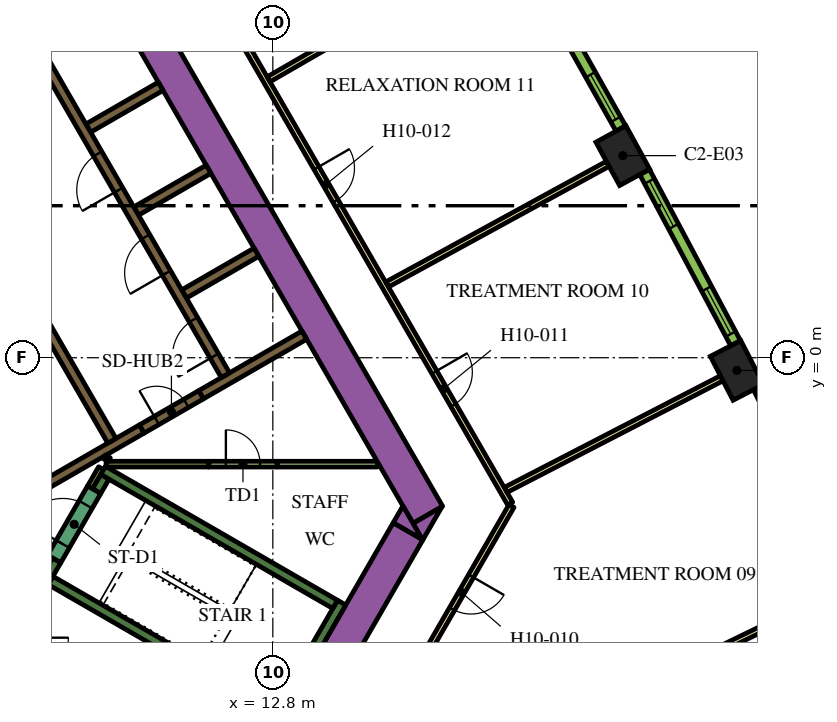
"""IFC4 building model, lengths in metres.
Left out: names, types, materials, properties, quantities, classifications, styles, units other than length and angle.
Written with IfcOpenShell. Run it as: python <this file> out.ifc"""

import sys

from ifc_helpers import new_model, si_unit, direction, frame, frame_2d, origin, origin_2d, place, context, subcontext, project, spatial, polyline, rectangle, outline, extrude, element, fill, save


model = new_model("IFC4")
c1 = context("Model", 3, precision=1e-05, world=origin(), true_north=direction((0.0, 1.0)))
c2 = subcontext(c1, "Body", "Model", "MODEL_VIEW")
j1 = project(units=[si_unit("LENGTHUNIT", "METRE"), si_unit("PLANEANGLEUNIT", "RADIAN")], contexts=[c1])
p1 = place(None, origin())
s1 = spatial("IfcSite", under=j1, at=p1, CompositionType="ELEMENT")
p2 = place(p1, origin())
s2 = spatial("IfcBuilding", under=s1, at=p2, CompositionType="ELEMENT")
p3 = place(p2, frame((0.0, 0.0, 130.5)))
s3 = spatial("IfcBuildingStorey", under=s2, at=p3, CompositionType="ELEMENT", Elevation=130.5)
for number, where, z_axis, x_axis in (
    (1, (25.012, -0.334, 0.0), (0.0, 0.0, 1.0), (-0.459, 0.888, 0.0)),
    (2, (22.009, 5.317, 0.0), (0.0, 0.0, 1.0), (-0.48, 0.877, 0.0)),
):
    element("IfcColumn", number, at=place(p3, frame(where, z_axis=z_axis, x_axis=x_axis)), inside=s3, PredefinedType="COLUMN", context=c2, shape_type="SweptSolid", body=[
        extrude(rectangle(XDim=1.3, YDim=0.9, at=origin_2d()), origin(), (0.0, 0.0, 1.0), 3.9),
    ])
p4 = place(p3, frame((6.776, 13.364, 0.0), z_axis=(0.0, 0.0, 1.0), x_axis=(0.500004177138, -0.8660229921, 0.0)))
e3 = element("IfcWall", 3, at=p4, inside=s3, PredefinedType="SOLIDWALL", context=c2, shape_type="SweptSolid", body=[
    extrude(rectangle(XDim=20.204, YDim=0.9, at=frame_2d((10.102, 0.0))), origin(), (0.0, 0.0, 1.0), 3.9),
])
p5 = place(p3, origin())
e4 = element("IfcWall", 4, at=p5, inside=s3, PredefinedType="SOLIDWALL", context=c2, shape_type="SweptSolid", body=[
    extrude(outline(polyline([(16.743, -4.8), (16.489, -4.36), (17.251, -3.92), (16.743, -4.8)])), origin(), (0.0, 0.0, 1.0), 3.9),
])
p6 = place(p3, frame((11.695, -12.644, 0.0), z_axis=(0.0, 0.0, 1.0), x_axis=(0.500010229568, 0.86601949766, 0.0)))
e5 = element("IfcWall", 5, at=p6, inside=s3, PredefinedType="SOLIDWALL", context=c2, shape_type="SweptSolid", body=[
    extrude(rectangle(XDim=9.326, YDim=0.9, at=frame_2d((4.663, 0.0))), origin(), (0.0, 0.0, 1.0), 3.9),
])
e6 = element("IfcWall", 6, at=p5, inside=s3, PredefinedType="SOLIDWALL", context=c2, shape_type="SweptSolid", body=[
    extrude(outline(polyline([(16.223, -3.9), (16.732, -4.78), (15.969, -4.34), (16.223, -3.9)])), origin(), (0.0, 0.0, 1.0), 3.9),
])
p7 = place(p3, frame((12.885, -9.431, 0.0), z_axis=(0.0, 0.0, 1.0), x_axis=(0.500020560727, 0.866013532718, 0.0)))
e7 = element("IfcWall", 7, at=p7, inside=s3, PredefinedType="SOLIDWALL", context=c2, shape_type="SweptSolid", body=[
    extrude(rectangle(XDim=3.45, YDim=0.25, at=frame_2d((1.725, 0.0))), origin(), (0.0, 0.0, 1.0), 3.9),
])
p8 = place(p3, frame((12.84, -9.261, 0.0), z_axis=(0.0, 0.0, 1.0), x_axis=(-0.866013990052, 0.500019768644, 0.0)))
e8 = element("IfcWall", 8, at=p8, inside=s3, PredefinedType="SOLIDWALL", context=c2, shape_type="SweptSolid", body=[
    extrude(rectangle(XDim=6.8, YDim=0.25, at=frame_2d((3.4, 0.0))), origin(), (0.0, 0.0, 1.0), 3.9),
])
p9 = place(p3, frame((7.113, -5.33, 0.0), z_axis=(0.0, 0.0, 1.0), x_axis=(-0.499965889992, -0.866045096311, 0.0)))
e9 = element("IfcWall", 9, at=p9, inside=s3, PredefinedType="SOLIDWALL", context=c2, shape_type="SweptSolid", body=[
    extrude(rectangle(XDim=0.666, YDim=0.25, at=frame_2d((0.333, 0.0))), origin(), (0.0, 0.0, 1.0), 3.9),
])
p10 = place(p3, frame((8.334, -2.964, 0.0), z_axis=(0.0, 0.0, 1.0), x_axis=(0.866016039709, -0.500016218704, 0.0)))
e10 = element("IfcWall", 10, at=p10, inside=s3, PredefinedType="SOLIDWALL", context=c2, shape_type="SweptSolid", body=[
    extrude(rectangle(XDim=7.05, YDim=0.25, at=frame_2d((3.525, 0.0))), origin(), (0.0, 0.0, 1.0), 3.9),
])
p11 = place(p3, frame((8.163, -3.511, 0.0), z_axis=(0.0, 0.0, 1.0), x_axis=(0.500127794843, 0.865951608824, 0.0)))
e11 = element("IfcWall", 11, at=p11, inside=s3, PredefinedType="SOLIDWALL", context=c2, shape_type="SweptSolid", body=[
    extrude(rectangle(XDim=0.435, YDim=0.25, at=frame_2d((0.217, 0.0))), origin(), (0.0, 0.0, 1.0), 3.9),
])
p12 = place(p3, frame((9.352, -1.875, 0.0), z_axis=(0.0, 0.0, 1.0), x_axis=(-0.866024844342, -0.500000968981, 0.0)))
e12 = element("IfcWall", 12, at=p12, inside=s3, PredefinedType="SOLIDWALL", context=c2, shape_type="SweptSolid", body=[
    extrude(rectangle(XDim=3.162, YDim=0.25, at=frame_2d((1.581, 0.0))), origin(), (0.0, 0.0, 1.0), 3.9),
])
for number, where, z_axis, x_axis in (
    (13, (7.944, 6.041, 0.0), (0.0, 0.0, 1.0), (0.866, 0.5, 0.0)),
    (14, (9.204, 3.859, 0.0), (0.0, 0.0, 1.0), (0.866, 0.5, 0.0)),
):
    element("IfcWall", number, at=place(p3, frame(where, z_axis=z_axis, x_axis=x_axis)), inside=s3, PredefinedType="SOLIDWALL", context=c2, shape_type="SweptSolid", body=[
        extrude(rectangle(XDim=2.2, YDim=0.25, at=frame_2d((1.1, 0.0))), origin(), (0.0, 0.0, 1.0), 3.9),
    ])
p13 = place(p3, frame((10.911, -0.975, 0.0), z_axis=(0.0, 0.0, 1.0), x_axis=(0.866046979468, 0.499962627957, 0.0)))
e15 = element("IfcWall", 15, at=p13, inside=s3, PredefinedType="SOLIDWALL", context=c2, shape_type="SweptSolid", body=[
    extrude(rectangle(XDim=3.138, YDim=0.25, at=frame_2d((1.569, 0.0))), origin(), (0.0, 0.0, 1.0), 3.9),
])
p14 = place(p3, frame((10.464, 1.677, 0.0), z_axis=(0.0, 0.0, 1.0), x_axis=(0.86605622881, 0.499946605688, 0.0)))
e16 = element("IfcWall", 16, at=p14, inside=s3, PredefinedType="SOLIDWALL", context=c2, shape_type="SweptSolid", body=[
    extrude(rectangle(XDim=2.2, YDim=0.25, at=frame_2d((1.1, 0.0))), origin(), (0.0, 0.0, 1.0), 3.9),
])
p15 = place(p3, frame((8.412, -2.8, 0.0), z_axis=(0.0, 0.0, 1.0), x_axis=(1.0, 0.0, 0.0)))
e17 = element("IfcWall", 17, at=p15, inside=s3, PredefinedType="PARTITIONING", context=c2, shape_type="SweptSolid", body=[
    extrude(rectangle(XDim=2.702, YDim=0.15, at=frame_2d((1.351, 0.0))), origin(), (0.0, 0.0, 1.0), 3.9),
])
p16 = place(p3, frame((8.459, -2.599, 0.0), z_axis=(0.0, 0.0, 1.0), x_axis=(-0.501919277433, -0.864914469148, 0.0)))
e18 = element("IfcWall", 18, at=p16, inside=s3, PredefinedType="PARTITIONING", context=c2, shape_type="SweptSolid", body=[
    extrude(rectangle(XDim=0.109, YDim=0.15, at=frame_2d((0.054, 0.0))), origin(), (0.0, 0.0, 1.0), 3.9),
])
p17 = place(p3, frame((8.281, -2.907, 0.0), z_axis=(0.0, 0.0, 1.0), x_axis=(-0.500193841991, -0.86591346013, 0.0)))
e19 = element("IfcWall", 19, at=p17, inside=s3, PredefinedType="PARTITIONING", context=c2, shape_type="SweptSolid", body=[
    extrude(rectangle(XDim=0.583, YDim=0.15, at=frame_2d((0.292, 0.0))), origin(), (0.0, 0.0, 1.0), 3.9),
])
p18 = place(p3, frame((12.915, -2.8, 0.0), z_axis=(0.0, 0.0, 1.0), x_axis=(1.0, 0.0, 0.0)))
e20 = element("IfcWall", 20, at=p18, inside=s3, PredefinedType="PARTITIONING", context=c2, shape_type="SweptSolid", body=[
    extrude(rectangle(XDim=2.637, YDim=0.15, at=frame_2d((1.318, 0.0))), origin(), (0.0, 0.0, 1.0), 2.6),
])
p19 = place(p3, frame((11.553, -0.46, 0.0), z_axis=(0.0, 0.0, 1.0), x_axis=(-0.500006514828, 0.866021642414, 0.0)))
e21 = element("IfcWall", 21, at=p19, inside=s3, PredefinedType="SOLIDWALL", context=c2, shape_type="SweptSolid", body=[
    extrude(rectangle(XDim=12.35, YDim=0.25, at=frame_2d((6.175, 0.0))), origin(), (0.0, 0.0, 1.0), 3.9),
])
p20 = place(p19, frame((0.585, 0.0, 0.0)))
e22 = element("IfcOpeningElement", 22, at=p20, cuts=e21, PredefinedType="OPENING", context=c2, shape_type="SweptSolid", body=[
    extrude(rectangle(XDim=1.1, YDim=2.1, at=frame_2d((0.55, 1.05))), frame((0.0, 0.135, 0.0), z_axis=(0.0, -1.0, 0.0), x_axis=(1.0, 0.0, 0.0)), (0.0, 0.0, 1.0), 0.27),
])
p21 = place(p19, frame((3.105, 0.0, 0.0)))
e23 = element("IfcOpeningElement", 23, at=p21, cuts=e21, PredefinedType="OPENING", context=c2, shape_type="SweptSolid", body=[
    extrude(rectangle(XDim=1.1, YDim=2.1, at=frame_2d((0.55, 1.05))), frame((0.0, 0.135, 0.0), z_axis=(0.0, -1.0, 0.0), x_axis=(1.0, 0.0, 0.0)), (0.0, 0.0, 1.0), 0.27),
])
p22 = place(p19, frame((5.625, 0.0, 0.0)))
e24 = element("IfcOpeningElement", 24, at=p22, cuts=e21, PredefinedType="OPENING", context=c2, shape_type="SweptSolid", body=[
    extrude(rectangle(XDim=1.1, YDim=2.1, at=frame_2d((0.55, 1.05))), frame((0.0, 0.135, 0.0), z_axis=(0.0, -1.0, 0.0), x_axis=(1.0, 0.0, 0.0)), (0.0, 0.0, 1.0), 0.27),
])
p23 = place(p3, frame((8.565, -2.185, 0.0), z_axis=(0.0, 0.0, 1.0), x_axis=(-0.499997954832, 0.866026584559, 0.0)))
e25 = element("IfcWall", 25, at=p23, inside=s3, PredefinedType="SOLIDWALL", context=c2, shape_type="SweptSolid", body=[
    extrude(rectangle(XDim=12.35, YDim=0.25, at=frame_2d((6.175, 0.0))), origin(), (0.0, 0.0, 1.0), 3.9),
])
p24 = place(p23, frame((5.725, 0.0, 0.0)))
e26 = element("IfcOpeningElement", 26, at=p24, cuts=e25, PredefinedType="OPENING", context=c2, shape_type="SweptSolid", body=[
    extrude(rectangle(XDim=0.9, YDim=2.1, at=frame_2d((0.45, 1.05))), frame((0.0, 0.135, 0.0), z_axis=(0.0, -1.0, 0.0), x_axis=(1.0, 0.0, 0.0)), (0.0, 0.0, 1.0), 0.27),
])
p25 = place(p3, frame((7.048, -5.292, 0.0), z_axis=(0.0, 0.0, 1.0), x_axis=(0.49994051562, 0.866059744384, 0.0)))
e27 = element("IfcWall", 27, at=p25, inside=s3, PredefinedType="SOLIDWALL", context=c2, shape_type="SweptSolid", body=[
    extrude(rectangle(XDim=2.1, YDim=0.4, at=frame_2d((1.05, 0.0))), origin(), (0.0, 0.0, 1.0), 3.9),
])
p26 = place(p25, frame((0.45, 0.0, 0.0)))
e28 = element("IfcOpeningElement", 28, at=p26, cuts=e27, PredefinedType="OPENING", context=c2, shape_type="SweptSolid", body=[
    extrude(rectangle(XDim=1.2, YDim=2.1, at=frame_2d((0.6, 1.05))), frame((0.0, 0.21, 0.0), z_axis=(0.0, -1.0, 0.0), x_axis=(1.0, 0.0, 0.0)), (0.0, 0.0, 1.0), 0.42),
])
p27 = place(p3, frame((9.352, -1.875, 0.0), z_axis=(0.0, 0.0, 1.0), x_axis=(0.865989075817, 0.500062916607, 0.0)))
e29 = element("IfcWall", 29, at=p27, inside=s3, PredefinedType="SOLIDWALL", context=c2, shape_type="SweptSolid", body=[
    extrude(rectangle(XDim=1.8, YDim=0.25, at=frame_2d((0.9, 0.0))), origin(), (0.0, 0.0, 1.0), 3.9),
])
p28 = place(p27, frame((0.45, 0.0, 0.0)))
e30 = element("IfcOpeningElement", 30, at=p28, cuts=e29, PredefinedType="OPENING", context=c2, shape_type="SweptSolid", body=[
    extrude(rectangle(XDim=0.9, YDim=2.1, at=frame_2d((0.45, 1.05))), frame((0.0, 0.135, 0.0), z_axis=(0.0, -1.0, 0.0), x_axis=(1.0, 0.0, 0.0)), (0.0, 0.0, 1.0), 0.27),
])
p29 = place(p3, frame((11.115, -2.8, 0.0), z_axis=(0.0, 0.0, 1.0), x_axis=(1.0, 0.0, 0.0)))
e31 = element("IfcWall", 31, at=p29, inside=s3, PredefinedType="PARTITIONING", context=c2, shape_type="SweptSolid", body=[
    extrude(rectangle(XDim=1.8, YDim=0.15, at=frame_2d((0.9, 0.0))), origin(), (0.0, 0.0, 1.0), 2.6),
])
p30 = place(p29, frame((0.45, 0.0, 0.0)))
e32 = element("IfcOpeningElement", 32, at=p30, cuts=e31, PredefinedType="OPENING", context=c2, shape_type="SweptSolid", body=[
    extrude(rectangle(XDim=0.9, YDim=2.1, at=frame_2d((0.45, 1.05))), frame((0.0, 0.085, 0.0), z_axis=(0.0, -1.0, 0.0), x_axis=(1.0, 0.0, 0.0)), (0.0, 0.0, 1.0), 0.17),
])
p31 = place(p3, frame((19.081, -3.9, 0.0), z_axis=(0.0, 0.0, 1.0), x_axis=(-0.499974327079, -0.866040225545, 0.0)))
e33 = element("IfcWall", 33, at=p31, inside=s3, PredefinedType="PARTITIONING", context=c2, shape_type="SweptSolid", body=[
    extrude(rectangle(XDim=5.258, YDim=0.15, at=frame_2d((2.629, 0.0))), origin(), (0.0, 0.0, 1.0), 2.6),
])
p32 = place(p31, frame((2.129, 0.0, 0.0)))
e34 = element("IfcOpeningElement", 34, at=p32, cuts=e33, PredefinedType="OPENING", context=c2, shape_type="SweptSolid", body=[
    extrude(rectangle(XDim=1.0, YDim=2.1, at=frame_2d((0.5, 1.05))), frame((0.0, 0.085, 0.0), z_axis=(0.0, -1.0, 0.0), x_axis=(1.0, 0.0, 0.0)), (0.0, 0.0, 1.0), 0.17),
])
p33 = place(p3, frame((6.163, 18.475, 0.0), z_axis=(0.0, 0.0, 1.0), x_axis=(0.500001317485, -0.866024643133, 0.0)))
e35 = element("IfcWall", 35, at=p33, inside=s3, PredefinedType="PARTITIONING", context=c2, shape_type="SweptSolid", body=[
    extrude(rectangle(XDim=25.767, YDim=0.15, at=frame_2d((12.883, 0.0))), origin(), (0.0, 0.0, 1.0), 2.6),
])
p34 = place(p33, frame((21.774, 0.0, 0.0)))
e36 = element("IfcOpeningElement", 36, at=p34, cuts=e35, PredefinedType="OPENING", context=c2, shape_type="SweptSolid", body=[
    extrude(rectangle(XDim=1.0, YDim=2.1, at=frame_2d((0.5, 1.05))), frame((0.0, 0.085, 0.0), z_axis=(0.0, -1.0, 0.0), x_axis=(1.0, 0.0, 0.0)), (0.0, 0.0, 1.0), 0.17),
])
p35 = place(p33, frame((15.571, 0.0, 0.0)))
e37 = element("IfcOpeningElement", 37, at=p35, cuts=e35, PredefinedType="OPENING", context=c2, shape_type="SweptSolid", body=[
    extrude(rectangle(XDim=1.0, YDim=2.1, at=frame_2d((0.5, 1.05))), frame((0.0, 0.085, 0.0), z_axis=(0.0, -1.0, 0.0), x_axis=(1.0, 0.0, 0.0)), (0.0, 0.0, 1.0), 0.17),
])
p36 = place(p33, frame((9.265, 0.0, 0.0)))
e38 = element("IfcOpeningElement", 38, at=p36, cuts=e35, PredefinedType="OPENING", context=c2, shape_type="SweptSolid", body=[
    extrude(rectangle(XDim=1.0, YDim=2.1, at=frame_2d((0.5, 1.05))), frame((0.0, 0.085, 0.0), z_axis=(0.0, -1.0, 0.0), x_axis=(1.0, 0.0, 0.0)), (0.0, 0.0, 1.0), 0.17),
])
p37 = place(p33, frame((3.063, 0.0, 0.0)))
e39 = element("IfcOpeningElement", 39, at=p37, cuts=e35, PredefinedType="OPENING", context=c2, shape_type="SweptSolid", body=[
    extrude(rectangle(XDim=1.0, YDim=2.1, at=frame_2d((0.5, 1.05))), frame((0.0, 0.085, 0.0), z_axis=(0.0, -1.0, 0.0), x_axis=(1.0, 0.0, 0.0)), (0.0, 0.0, 1.0), 0.17),
])
p38 = place(p3, frame((18.484, 10.672, 0.0), z_axis=(0.0, 0.0, 1.0), x_axis=(-0.866019162053, -0.50001081084, 0.0)))
e40 = element("IfcWall", 40, at=p38, inside=s3, PredefinedType="PARTITIONING", context=c2, shape_type="SweptSolid", body=[
    extrude(rectangle(XDim=6.694, YDim=0.15, at=frame_2d((3.347, 0.0))), origin(), (0.0, 0.0, 1.0), 2.6),
])
p39 = place(p3, frame((21.614, 5.102, 0.0), z_axis=(0.0, 0.0, 1.0), x_axis=(-0.877484555087, -0.479604895287, 0.0)))
e41 = element("IfcWall", 41, at=p39, inside=s3, PredefinedType="PARTITIONING", context=c2, shape_type="SweptSolid", body=[
    extrude(rectangle(XDim=6.611, YDim=0.15, at=frame_2d((3.306, 0.0))), origin(), (0.0, 0.0, 1.0), 2.6),
])
p40 = place(p3, frame((24.613, -0.541, 0.0), z_axis=(0.0, 0.0, 1.0), x_axis=(-0.888459912519, -0.458954228487, 0.0)))
e42 = element("IfcWall", 42, at=p40, inside=s3, PredefinedType="PARTITIONING", context=c2, shape_type="SweptSolid", body=[
    extrude(rectangle(XDim=6.392, YDim=0.15, at=frame_2d((3.196, 0.0))), origin(), (0.0, 0.0, 1.0), 2.6),
])
p41 = place(p3, frame((27.479, -6.251, 0.0), z_axis=(0.0, 0.0, 1.0), x_axis=(-0.898945877276, -0.438059710231, 0.0)))
e43 = element("IfcWall", 43, at=p41, inside=s3, PredefinedType="PARTITIONING", context=c2, shape_type="SweptSolid", body=[
    extrude(rectangle(XDim=8.909, YDim=0.15, at=frame_2d((4.455, 0.0))), origin(), (0.0, 0.0, 1.0), 2.6),
])
p42 = place(p3, frame((27.864, -5.336, 0.0), z_axis=(0.0, 0.0, 1.0), x_axis=(-0.448534297211, 0.893765620409, 0.0)))
e44 = element("IfcWall", 44, at=p42, inside=s3, PredefinedType="SOLIDWALL", context=c2, shape_type="SweptSolid", body=[
    extrude(rectangle(XDim=5.1, YDim=0.29, at=frame_2d((2.55, 0.0))), origin(), (0.0, 0.0, 1.0), 3.5),
])
p43 = place(p42, frame((0.272, 0.0, 0.9)))
e45 = element("IfcOpeningElement", 45, at=p43, cuts=e44, PredefinedType="OPENING", context=c2, shape_type="SweptSolid", body=[
    extrude(rectangle(XDim=1.35, YDim=2.15, at=frame_2d((0.675, 1.075))), frame((0.0, 0.155, 0.0), z_axis=(0.0, -1.0, 0.0), x_axis=(1.0, 0.0, 0.0)), (0.0, 0.0, 1.0), 0.31),
])
p44 = place(p42, frame((3.478, 0.0, 0.9)))
e46 = element("IfcOpeningElement", 46, at=p44, cuts=e44, PredefinedType="OPENING", context=c2, shape_type="SweptSolid", body=[
    extrude(rectangle(XDim=1.35, YDim=2.15, at=frame_2d((0.675, 1.075))), frame((0.0, 0.155, 0.0), z_axis=(0.0, -1.0, 0.0), x_axis=(1.0, 0.0, 0.0)), (0.0, 0.0, 1.0), 0.31),
])
p45 = place(p3, frame((24.977, 0.383, 0.0), z_axis=(0.0, 0.0, 1.0), x_axis=(-0.469323203119, 0.883026461106, 0.0)))
e47 = element("IfcWall", 47, at=p45, inside=s3, PredefinedType="SOLIDWALL", context=c2, shape_type="SweptSolid", body=[
    extrude(rectangle(XDim=5.101, YDim=0.29, at=frame_2d((2.55, 0.0))), origin(), (0.0, 0.0, 1.0), 3.5),
])
p46 = place(p45, frame((0.273, 0.0, 0.9)))
e48 = element("IfcOpeningElement", 48, at=p46, cuts=e47, PredefinedType="OPENING", context=c2, shape_type="SweptSolid", body=[
    extrude(rectangle(XDim=1.35, YDim=2.15, at=frame_2d((0.675, 1.075))), frame((0.0, 0.155, 0.0), z_axis=(0.0, -1.0, 0.0), x_axis=(1.0, 0.0, 0.0)), (0.0, 0.0, 1.0), 0.31),
])
p47 = place(p45, frame((3.478, 0.0, 0.9)))
e49 = element("IfcOpeningElement", 49, at=p47, cuts=e47, PredefinedType="OPENING", context=c2, shape_type="SweptSolid", body=[
    extrude(rectangle(XDim=1.35, YDim=2.15, at=frame_2d((0.675, 1.075))), frame((0.0, 0.155, 0.0), z_axis=(0.0, -1.0, 0.0), x_axis=(1.0, 0.0, 0.0)), (0.0, 0.0, 1.0), 0.31),
])
p48 = place(p3, frame((21.956, 6.033, 0.0), z_axis=(0.0, 0.0, 1.0), x_axis=(-0.48983164787, 0.87181704316, 0.0)))
e50 = element("IfcWall", 50, at=p48, inside=s3, PredefinedType="SOLIDWALL", context=c2, shape_type="SweptSolid", body=[
    extrude(rectangle(XDim=5.1, YDim=0.29, at=frame_2d((2.55, 0.0))), origin(), (0.0, 0.0, 1.0), 3.5),
])
p49 = place(p48, frame((0.273, 0.0, 0.9)))
e51 = element("IfcOpeningElement", 51, at=p49, cuts=e50, PredefinedType="OPENING", context=c2, shape_type="SweptSolid", body=[
    extrude(rectangle(XDim=1.35, YDim=2.15, at=frame_2d((0.675, 1.075))), frame((0.0, 0.155, 0.0), z_axis=(0.0, -1.0, 0.0), x_axis=(1.0, 0.0, 0.0)), (0.0, 0.0, 1.0), 0.31),
])
p50 = place(p48, frame((3.478, 0.0, 0.9)))
e52 = element("IfcOpeningElement", 52, at=p50, cuts=e50, PredefinedType="OPENING", context=c2, shape_type="SweptSolid", body=[
    extrude(rectangle(XDim=1.35, YDim=2.15, at=frame_2d((0.675, 1.075))), frame((0.0, 0.155, 0.0), z_axis=(0.0, -1.0, 0.0), x_axis=(1.0, 0.0, 0.0)), (0.0, 0.0, 1.0), 0.31),
])
p51 = place(p20, origin())
e53 = element("IfcDoor", 53, at=p51, inside=s3, OperationType="DOUBLE_DOOR_SLIDING", PredefinedType="DOOR", context=c2, shape_type="SweptSolid", body=[
    extrude(rectangle(XDim=1.1, YDim=2.1, at=frame_2d((0.55, 1.05))), frame((0.0, 0.025, 0.0), z_axis=(0.0, -1.0, 0.0), x_axis=(1.0, 0.0, 0.0)), (0.0, 0.0, 1.0), 0.05),
])
fill(e22, e53)
p52 = place(p21, origin())
e54 = element("IfcDoor", 54, at=p52, inside=s3, OperationType="DOUBLE_DOOR_SLIDING", PredefinedType="DOOR", context=c2, shape_type="SweptSolid", body=[
    extrude(rectangle(XDim=1.1, YDim=2.1, at=frame_2d((0.55, 1.05))), frame((0.0, 0.025, 0.0), z_axis=(0.0, -1.0, 0.0), x_axis=(1.0, 0.0, 0.0)), (0.0, 0.0, 1.0), 0.05),
])
fill(e23, e54)
p53 = place(p22, origin())
e55 = element("IfcDoor", 55, at=p53, inside=s3, OperationType="DOUBLE_DOOR_SLIDING", PredefinedType="DOOR", context=c2, shape_type="SweptSolid", body=[
    extrude(rectangle(XDim=1.1, YDim=2.1, at=frame_2d((0.55, 1.05))), frame((0.0, 0.025, 0.0), z_axis=(0.0, -1.0, 0.0), x_axis=(1.0, 0.0, 0.0)), (0.0, 0.0, 1.0), 0.05),
])
fill(e24, e55)
p54 = place(p26, origin())
e56 = element("IfcDoor", 56, at=p54, inside=s3, OperationType="SINGLE_SWING_LEFT", PredefinedType="DOOR", context=c2, shape_type="SweptSolid", body=[
    extrude(rectangle(XDim=1.2, YDim=2.1, at=frame_2d((0.6, 1.05))), frame((0.0, 0.025, 0.0), z_axis=(0.0, -1.0, 0.0), x_axis=(1.0, 0.0, 0.0)), (0.0, 0.0, 1.0), 0.05),
])
fill(e28, e56)
p55 = place(p28, origin())
e57 = element("IfcDoor", 57, at=p55, inside=s3, OperationType="SINGLE_SWING_LEFT", PredefinedType="DOOR", context=c2, shape_type="SweptSolid", body=[
    extrude(rectangle(XDim=0.9, YDim=2.1, at=frame_2d((0.45, 1.05))), frame((0.0, 0.025, 0.0), z_axis=(0.0, -1.0, 0.0), x_axis=(1.0, 0.0, 0.0)), (0.0, 0.0, 1.0), 0.05),
])
fill(e30, e57)
p56 = place(p30, origin())
e58 = element("IfcDoor", 58, at=p56, inside=s3, OperationType="SINGLE_SWING_LEFT", PredefinedType="DOOR", context=c2, shape_type="SweptSolid", body=[
    extrude(rectangle(XDim=0.9, YDim=2.1, at=frame_2d((0.45, 1.05))), frame((0.0, 0.025, 0.0), z_axis=(0.0, -1.0, 0.0), x_axis=(1.0, 0.0, 0.0)), (0.0, 0.0, 1.0), 0.05),
])
fill(e32, e58)
p57 = place(p32, origin())
e59 = element("IfcDoor", 59, at=p57, inside=s3, OperationType="SINGLE_SWING_LEFT", PredefinedType="DOOR", context=c2, shape_type="SweptSolid", body=[
    extrude(rectangle(XDim=1.0, YDim=2.1, at=frame_2d((0.5, 1.05))), frame((0.0, 0.025, 0.0), z_axis=(0.0, -1.0, 0.0), x_axis=(1.0, 0.0, 0.0)), (0.0, 0.0, 1.0), 0.05),
])
fill(e34, e59)
p58 = place(p34, origin())
e60 = element("IfcDoor", 60, at=p58, inside=s3, OperationType="SINGLE_SWING_RIGHT", PredefinedType="DOOR", context=c2, shape_type="SweptSolid", body=[
    extrude(rectangle(XDim=1.0, YDim=2.1, at=frame_2d((0.5, 1.05))), frame((0.0, 0.025, 0.0), z_axis=(0.0, -1.0, 0.0), x_axis=(1.0, 0.0, 0.0)), (0.0, 0.0, 1.0), 0.05),
])
fill(e36, e60)
p59 = place(p35, origin())
e61 = element("IfcDoor", 61, at=p59, inside=s3, OperationType="SINGLE_SWING_LEFT", PredefinedType="DOOR", context=c2, shape_type="SweptSolid", body=[
    extrude(rectangle(XDim=1.0, YDim=2.1, at=frame_2d((0.5, 1.05))), frame((0.0, 0.025, 0.0), z_axis=(0.0, -1.0, 0.0), x_axis=(1.0, 0.0, 0.0)), (0.0, 0.0, 1.0), 0.05),
])
fill(e37, e61)
p60 = place(p46, origin())
e62 = element("IfcWindow", 62, at=p60, inside=s3, PartitioningType="DOUBLE_PANEL_VERTICAL", PredefinedType="WINDOW", context=c2, shape_type="SweptSolid", body=[
    extrude(rectangle(XDim=1.35, YDim=2.15, at=frame_2d((0.675, 1.075))), frame((0.0, 0.015, 0.0), z_axis=(0.0, -1.0, 0.0), x_axis=(1.0, 0.0, 0.0)), (0.0, 0.0, 1.0), 0.06),
])
fill(e48, e62)
p61 = place(p47, origin())
e63 = element("IfcWindow", 63, at=p61, inside=s3, PartitioningType="DOUBLE_PANEL_VERTICAL", PredefinedType="WINDOW", context=c2, shape_type="SweptSolid", body=[
    extrude(rectangle(XDim=1.35, YDim=2.15, at=frame_2d((0.675, 1.075))), frame((0.0, 0.015, 0.0), z_axis=(0.0, -1.0, 0.0), x_axis=(1.0, 0.0, 0.0)), (0.0, 0.0, 1.0), 0.06),
])
fill(e49, e63)
p62 = place(p49, origin())
e64 = element("IfcWindow", 64, at=p62, inside=s3, PartitioningType="DOUBLE_PANEL_VERTICAL", PredefinedType="WINDOW", context=c2, shape_type="SweptSolid", body=[
    extrude(rectangle(XDim=1.35, YDim=2.15, at=frame_2d((0.675, 1.075))), frame((0.0, 0.015, 0.0), z_axis=(0.0, -1.0, 0.0), x_axis=(1.0, 0.0, 0.0)), (0.0, 0.0, 1.0), 0.06),
])
fill(e51, e64)
save(model, sys.argv[1])
